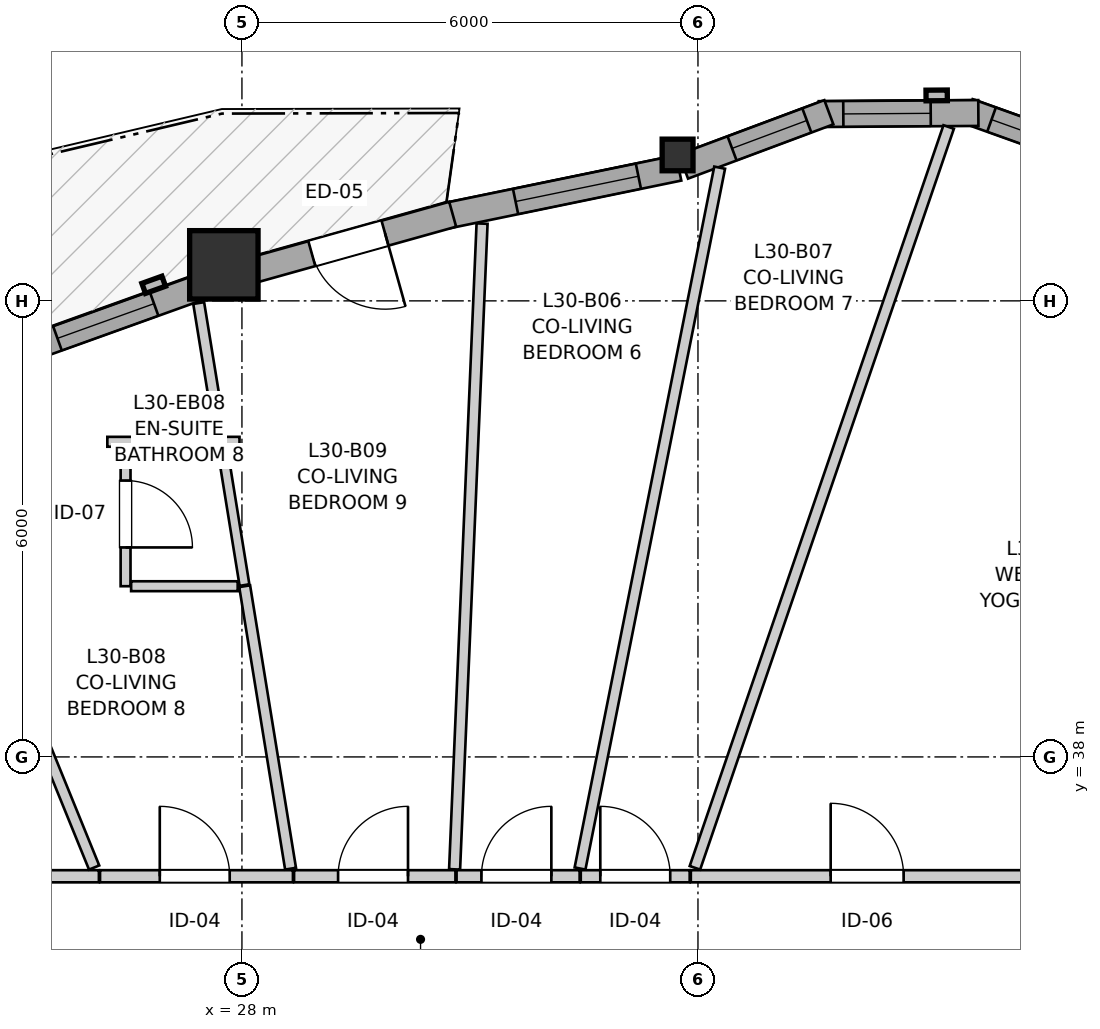
"""IFC4 building model, lengths in metres.
Left out: names, types, materials, properties, quantities, classifications, styles, units other than length and angle.
Written with IfcOpenShell. Run it as: python <this file> out.ifc"""

import sys

from ifc_helpers import new_model, si_unit, direction, frame, frame_2d, origin, origin_2d, place, context, subcontext, project, spatial, rectangle, i_section, extrude, source, transform, mapped, element, fill, save


model = new_model("IFC4")
c1 = context("Model", 3, precision=1e-05, world=origin(), true_north=direction((0.0, 1.0)))
c2 = subcontext(c1, "Body", "Model", "MODEL_VIEW")
j1 = project(units=[si_unit("LENGTHUNIT", "METRE"), si_unit("PLANEANGLEUNIT", "RADIAN")], contexts=[c1])
p1 = place(None, origin())
s1 = spatial("IfcSite", under=j1, at=p1, CompositionType="ELEMENT")
p2 = place(p1, origin())
s2 = spatial("IfcBuilding", under=s1, at=p2, CompositionType="ELEMENT")
p3 = place(p2, frame((0.0, 0.0, 102.4)))
s3 = spatial("IfcBuildingStorey", under=s2, at=p3, CompositionType="ELEMENT", Elevation=102.4)
m1 = source(origin(), c2, "Body", "SweptSolid", [
    extrude(i_section(OverallWidth=0.406, OverallDepth=0.416, WebThickness=0.027, FlangeThickness=0.044, FilletRadius=0.015, at=origin_2d()), origin(), (0.0, 0.0, 1.0), 2.95),
])
p4 = place(p3, frame((33.732, 45.92, 0.0), z_axis=(0.0, 0.0, 1.0), x_axis=(1.0, 0.0, 0.0)))
e1 = element("IfcColumn", 1, at=p4, inside=s3, PredefinedType="PILASTER", context=c2, shape_type="MappedRepresentation", body=[
    mapped(m1, transform((0.0, 0.0, 0.0), x_axis=(1.0, 0.0, 0.0), y_axis=(0.0, 1.0, 0.0), z_axis=(0.0, 0.0, 1.0), scale=1.0)),
])
m2 = source(origin(), c2, "Body", "SweptSolid", [
    extrude(rectangle(XDim=0.9, YDim=0.9, at=origin_2d()), origin(), (0.0, 0.0, 1.0), 2.95),
])
p5 = place(p3, frame((27.762, 44.474, 0.0), z_axis=(0.0, 0.0, 1.0), x_axis=(1.0, 0.0, 0.0)))
e2 = element("IfcColumn", 2, at=p5, inside=s3, PredefinedType="COLUMN", context=c2, shape_type="MappedRepresentation", body=[
    mapped(m2, transform((0.0, 0.0, 0.0), x_axis=(1.0, 0.0, 0.0), y_axis=(0.0, 1.0, 0.0), z_axis=(0.0, 0.0, 1.0), scale=1.0)),
])
p6 = place(p3, frame((39.533, 45.787, 0.0), z_axis=(0.0, 0.0, 1.0), x_axis=(-0.941523304278, 0.336947870598, 0.0)))
e3 = element("IfcWall", 3, at=p6, inside=s3, PredefinedType="SOLIDWALL", context=c2, shape_type="SweptSolid", body=[
    extrude(rectangle(XDim=2.099, YDim=0.34, at=frame_2d((1.05, 0.0))), origin(), (0.0, 0.0, 1.0), 2.48),
])
p7 = place(p6, frame((0.324, 0.0, 0.82)))
e4 = element("IfcOpeningElement", 4, at=p7, cuts=e3, PredefinedType="OPENING", context=c2, shape_type="SweptSolid", body=[
    extrude(rectangle(XDim=1.45, YDim=1.25, at=frame_2d((0.725, 0.625))), frame((0.0, 0.18, 0.0), z_axis=(0.0, -1.0, 0.0), x_axis=(1.0, 0.0, 0.0)), (0.0, 0.0, 1.0), 0.36),
])
p8 = place(p3, frame((37.689, 46.471, 0.0), z_axis=(0.0, 0.0, 1.0), x_axis=(-0.999976456891, -0.00686189939, 0.0)))
e5 = element("IfcWall", 5, at=p8, inside=s3, PredefinedType="SOLIDWALL", context=c2, shape_type="SweptSolid", body=[
    extrude(rectangle(XDim=2.099, YDim=0.34, at=frame_2d((1.05, 0.0))), origin(), (0.0, 0.0, 1.0), 2.48),
])
p9 = place(p8, frame((0.627, 0.0, 0.82)))
e6 = element("IfcOpeningElement", 6, at=p9, cuts=e5, PredefinedType="OPENING", context=c2, shape_type="SweptSolid", body=[
    extrude(rectangle(XDim=1.15, YDim=1.2, at=frame_2d((0.575, 0.6))), frame((0.0, 0.18, 0.0), z_axis=(0.0, -1.0, 0.0), x_axis=(1.0, 0.0, 0.0)), (0.0, 0.0, 1.0), 0.36),
])
p10 = place(p3, frame((35.722, 46.481, 0.0), z_axis=(0.0, 0.0, 1.0), x_axis=(-0.9368002254, -0.349864741994, 0.0)))
e7 = element("IfcWall", 7, at=p10, inside=s3, PredefinedType="SOLIDWALL", context=c2, shape_type="SweptSolid", body=[
    extrude(rectangle(XDim=2.041, YDim=0.34, at=frame_2d((1.021, 0.0))), origin(), (0.0, 0.0, 1.0), 2.48),
])
p11 = place(p10, frame((0.309, 0.0, 0.82)))
e8 = element("IfcOpeningElement", 8, at=p11, cuts=e7, PredefinedType="OPENING", context=c2, shape_type="SweptSolid", body=[
    extrude(rectangle(XDim=1.05, YDim=1.45, at=frame_2d((0.525, 0.725))), frame((0.0, 0.18, 0.0), z_axis=(0.0, -1.0, 0.0), x_axis=(1.0, 0.0, 0.0)), (0.0, 0.0, 1.0), 0.36),
])
p12 = place(p3, frame((33.747, 45.749, 0.0), z_axis=(0.0, 0.0, 1.0), x_axis=(-0.979440240026, -0.201734519153, 0.0)))
e9 = element("IfcWall", 9, at=p12, inside=s3, PredefinedType="SOLIDWALL", context=c2, shape_type="SweptSolid", body=[
    extrude(rectangle(XDim=3.124, YDim=0.34, at=frame_2d((1.562, 0.0))), origin(), (0.0, 0.0, 1.0), 2.48),
])
p13 = place(p12, frame((0.541, 0.0, 0.82)))
e10 = element("IfcOpeningElement", 10, at=p13, cuts=e9, PredefinedType="OPENING", context=c2, shape_type="SweptSolid", body=[
    extrude(rectangle(XDim=1.65, YDim=1.45, at=frame_2d((0.825, 0.725))), frame((0.0, 0.18, 0.0), z_axis=(0.0, -1.0, 0.0), x_axis=(1.0, 0.0, 0.0)), (0.0, 0.0, 1.0), 0.36),
])
p14 = place(p3, frame((30.773, 45.139, 0.0), z_axis=(0.0, 0.0, 1.0), x_axis=(-0.963038749839, -0.269362889627, 0.0)))
e11 = element("IfcWall", 11, at=p14, inside=s3, PredefinedType="SOLIDWALL", context=c2, shape_type="SweptSolid", body=[
    extrude(rectangle(XDim=2.849, YDim=0.34, at=frame_2d((1.424, 0.0))), origin(), (0.0, 0.0, 1.0), 2.48),
])
p15 = place(p14, frame((0.924, 0.0, 0.0)))
e12 = element("IfcOpeningElement", 12, at=p15, cuts=e11, PredefinedType="OPENING", context=c2, shape_type="SweptSolid", body=[
    extrude(rectangle(XDim=1.0, YDim=2.1, at=frame_2d((0.5, 1.05))), frame((0.0, 0.18, 0.0), z_axis=(0.0, -1.0, 0.0), x_axis=(1.0, 0.0, 0.0)), (0.0, 0.0, 1.0), 0.36),
])
p16 = place(p3, frame((27.603, 44.236, 0.0), z_axis=(0.0, 0.0, 1.0), x_axis=(-0.941110715193, -0.33809853852, 0.0)))
e13 = element("IfcWall", 13, at=p16, inside=s3, PredefinedType="SOLIDWALL", context=c2, shape_type="SweptSolid", body=[
    extrude(rectangle(XDim=2.799, YDim=0.34, at=frame_2d((1.399, 0.0))), origin(), (0.0, 0.0, 1.0), 2.48),
])
p17 = place(p16, frame((0.807, 0.0, 0.82)))
e14 = element("IfcOpeningElement", 14, at=p17, cuts=e13, PredefinedType="OPENING", context=c2, shape_type="SweptSolid", body=[
    extrude(rectangle(XDim=1.35, YDim=1.45, at=frame_2d((0.675, 0.725))), frame((0.0, 0.18, 0.0), z_axis=(0.0, -1.0, 0.0), x_axis=(1.0, 0.0, 0.0)), (0.0, 0.0, 1.0), 0.36),
])
p18 = place(p3, frame((33.906, 36.43, 0.0), z_axis=(0.0, 0.0, 1.0), x_axis=(1.0, 0.0, 0.0)))
e15 = element("IfcWall", 15, at=p18, inside=s3, PredefinedType="PARTITIONING", context=c2, shape_type="SweptSolid", body=[
    extrude(rectangle(XDim=4.624, YDim=0.16, at=frame_2d((2.312, 0.0))), origin(), (0.0, 0.0, 1.0), 2.588),
])
p19 = place(p18, frame((1.84, 0.0, 0.0)))
e16 = element("IfcOpeningElement", 16, at=p19, cuts=e15, PredefinedType="OPENING", context=c2, shape_type="SweptSolid", body=[
    extrude(rectangle(XDim=0.96, YDim=2.1, at=frame_2d((0.48, 1.05))), frame((0.0, 0.09, 0.0), z_axis=(0.0, -1.0, 0.0), x_axis=(1.0, 0.0, 0.0)), (0.0, 0.0, 1.0), 0.18),
])
p20 = place(p3, frame((22.17, 36.43, 0.0), z_axis=(0.0, 0.0, 1.0), x_axis=(1.0, 0.0, 0.0)))
e17 = element("IfcWall", 17, at=p20, inside=s3, PredefinedType="PARTITIONING", context=c2, shape_type="SweptSolid", body=[
    extrude(rectangle(XDim=3.948, YDim=0.16, at=frame_2d((1.974, 0.0))), origin(), (0.0, 0.0, 1.0), 2.588),
])
p21 = place(p20, frame((1.506, 0.0, 0.0)))
e18 = element("IfcOpeningElement", 18, at=p21, cuts=e17, PredefinedType="OPENING", context=c2, shape_type="SweptSolid", body=[
    extrude(rectangle(XDim=0.92, YDim=2.1, at=frame_2d((0.46, 1.05))), frame((0.0, 0.09, 0.0), z_axis=(0.0, -1.0, 0.0), x_axis=(1.0, 0.0, 0.0)), (0.0, 0.0, 1.0), 0.18),
])
p22 = place(p3, frame((26.133, 36.43, 0.0), z_axis=(0.0, 0.0, 1.0), x_axis=(1.0, 0.0, 0.0)))
e19 = element("IfcWall", 19, at=p22, inside=s3, PredefinedType="PARTITIONING", context=c2, shape_type="SweptSolid", body=[
    extrude(rectangle(XDim=2.538, YDim=0.16, at=frame_2d((1.269, 0.0))), origin(), (0.0, 0.0, 1.0), 2.95),
])
p23 = place(p22, frame((0.786, 0.0, 0.0)))
e20 = element("IfcOpeningElement", 20, at=p23, cuts=e19, PredefinedType="OPENING", context=c2, shape_type="SweptSolid", body=[
    extrude(rectangle(XDim=0.92, YDim=2.1, at=frame_2d((0.46, 1.05))), frame((0.0, 0.09, 0.0), z_axis=(0.0, -1.0, 0.0), x_axis=(1.0, 0.0, 0.0)), (0.0, 0.0, 1.0), 0.18),
])
p24 = place(p3, frame((28.686, 36.43, 0.0), z_axis=(0.0, 0.0, 1.0), x_axis=(1.0, 0.0, 0.0)))
e21 = element("IfcWall", 21, at=p24, inside=s3, PredefinedType="PARTITIONING", context=c2, shape_type="SweptSolid", body=[
    extrude(rectangle(XDim=2.123, YDim=0.16, at=frame_2d((1.062, 0.0))), origin(), (0.0, 0.0, 1.0), 2.95),
])
p25 = place(p24, frame((0.579, 0.0, 0.0)))
e22 = element("IfcOpeningElement", 22, at=p25, cuts=e21, PredefinedType="OPENING", context=c2, shape_type="SweptSolid", body=[
    extrude(rectangle(XDim=0.92, YDim=2.1, at=frame_2d((0.46, 1.05))), frame((0.0, 0.09, 0.0), z_axis=(0.0, -1.0, 0.0), x_axis=(1.0, 0.0, 0.0)), (0.0, 0.0, 1.0), 0.18),
])
p26 = place(p3, frame((26.469, 42.073, 0.0), z_axis=(0.0, 0.0, 1.0), x_axis=(0.0, -1.0, 0.0)))
e23 = element("IfcWall", 23, at=p26, inside=s3, PredefinedType="PARTITIONING", context=c2, shape_type="SweptSolid", body=[
    extrude(rectangle(XDim=1.827, YDim=0.13, at=frame_2d((0.914, 0.0))), origin(), (0.0, 0.0, 1.0), 2.95),
])
p27 = place(p26, frame((0.437, 0.0, 0.0)))
e24 = element("IfcOpeningElement", 24, at=p27, cuts=e23, PredefinedType="OPENING", context=c2, shape_type="SweptSolid", body=[
    extrude(rectangle(XDim=0.88, YDim=2.05, at=frame_2d((0.44, 1.025))), frame((0.0, 0.075, 0.0), z_axis=(0.0, -1.0, 0.0), x_axis=(1.0, 0.0, 0.0)), (0.0, 0.0, 1.0), 0.15),
])
p28 = place(p3, frame((30.824, 36.43, 0.0), z_axis=(0.0, 0.0, 1.0), x_axis=(1.0, 0.0, 0.0)))
e25 = element("IfcWall", 25, at=p28, inside=s3, PredefinedType="PARTITIONING", context=c2, shape_type="SweptSolid", body=[
    extrude(rectangle(XDim=1.619, YDim=0.16, at=frame_2d((0.81, 0.0))), origin(), (0.0, 0.0, 1.0), 2.95),
])
p29 = place(p28, frame((0.327, 0.0, 0.0)))
e26 = element("IfcOpeningElement", 26, at=p29, cuts=e25, PredefinedType="OPENING", context=c2, shape_type="SweptSolid", body=[
    extrude(rectangle(XDim=0.92, YDim=2.1, at=frame_2d((0.46, 1.05))), frame((0.0, 0.09, 0.0), z_axis=(0.0, -1.0, 0.0), x_axis=(1.0, 0.0, 0.0)), (0.0, 0.0, 1.0), 0.18),
])
p30 = place(p3, frame((32.458, 36.43, 0.0), z_axis=(0.0, 0.0, 1.0), x_axis=(1.0, 0.0, 0.0)))
e27 = element("IfcWall", 27, at=p30, inside=s3, PredefinedType="PARTITIONING", context=c2, shape_type="SweptSolid", body=[
    extrude(rectangle(XDim=1.433, YDim=0.16, at=frame_2d((0.717, 0.0))), origin(), (0.0, 0.0, 1.0), 2.95),
])
p31 = place(p30, frame((0.257, 0.0, 0.0)))
e28 = element("IfcOpeningElement", 28, at=p31, cuts=e27, PredefinedType="OPENING", context=c2, shape_type="SweptSolid", body=[
    extrude(rectangle(XDim=0.92, YDim=2.1, at=frame_2d((0.46, 1.05))), frame((0.0, 0.09, 0.0), z_axis=(0.0, -1.0, 0.0), x_axis=(1.0, 0.0, 0.0)), (0.0, 0.0, 1.0), 0.18),
])
p32 = place(p3, frame((33.96, 36.541, 0.0), z_axis=(0.0, 0.0, 1.0), x_axis=(0.324058346196, 0.946037096662, 0.0)))
e29 = element("IfcWall", 29, at=p32, inside=s3, PredefinedType="PARTITIONING", context=c2, shape_type="SweptSolid", body=[
    extrude(rectangle(XDim=10.302, YDim=0.145, at=frame_2d((5.151, 0.0))), origin(), (0.0, 0.0, 1.0), 2.95),
])
p33 = place(p3, frame((32.448, 36.532, 0.0), z_axis=(0.0, 0.0, 1.0), x_axis=(0.195406965811, 0.980722242897, 0.0)))
e30 = element("IfcWall", 30, at=p33, inside=s3, PredefinedType="PARTITIONING", context=c2, shape_type="SweptSolid", body=[
    extrude(rectangle(XDim=9.402, YDim=0.145, at=frame_2d((4.701, 0.0))), origin(), (0.0, 0.0, 1.0), 2.95),
])
p34 = place(p3, frame((30.798, 36.521, 0.0), z_axis=(0.0, 0.0, 1.0), x_axis=(0.042521424142, 0.999095555234, 0.0)))
e31 = element("IfcWall", 31, at=p34, inside=s3, PredefinedType="PARTITIONING", context=c2, shape_type="SweptSolid", body=[
    extrude(rectangle(XDim=8.503, YDim=0.145, at=frame_2d((4.252, 0.0))), origin(), (0.0, 0.0, 1.0), 2.95),
])
p35 = place(p3, frame((23.633, 42.493, 0.0), z_axis=(0.0, 0.0, 1.0), x_axis=(0.37719666663, -0.926133184096, 0.0)))
e32 = element("IfcWall", 32, at=p35, inside=s3, PredefinedType="PARTITIONING", context=c2, shape_type="SweptSolid", body=[
    extrude(rectangle(XDim=6.423, YDim=0.145, at=frame_2d((3.211, 0.0))), origin(), (0.0, 0.0, 1.0), 2.95),
])
p36 = place(p3, frame((28.036, 40.246, 0.0), z_axis=(0.0, 0.0, 1.0), x_axis=(0.160412651813, -0.987050039835, 0.0)))
e33 = element("IfcWall", 33, at=p36, inside=s3, PredefinedType="PARTITIONING", context=c2, shape_type="SweptSolid", body=[
    extrude(rectangle(XDim=3.765, YDim=0.145, at=frame_2d((1.883, 0.0))), origin(), (0.0, 0.0, 1.0), 2.368),
])
p37 = place(p3, frame((27.741, 42.063, 0.0), z_axis=(0.0, 0.0, 1.0), x_axis=(0.160081724147, -0.98710376435, 0.0)))
e34 = element("IfcWall", 34, at=p37, inside=s3, PredefinedType="PARTITIONING", context=c2, shape_type="SweptSolid", body=[
    extrude(rectangle(XDim=1.825, YDim=0.13, at=frame_2d((0.913, 0.0))), origin(), (0.0, 0.0, 1.0), 2.368),
])
p38 = place(p3, frame((27.431, 43.971, 0.0), z_axis=(0.0, 0.0, 1.0), x_axis=(0.160707234414, -0.987002119961, 0.0)))
e35 = element("IfcWall", 35, at=p38, inside=s3, PredefinedType="PARTITIONING", context=c2, shape_type="SweptSolid", body=[
    extrude(rectangle(XDim=1.749, YDim=0.145, at=frame_2d((0.874, 0.0))), origin(), (0.0, 0.0, 1.0), 2.95),
])
p39 = place(p3, frame((26.542, 40.246, 0.0), z_axis=(0.0, 0.0, 1.0), x_axis=(1.0, 0.0, 0.0)))
e36 = element("IfcWall", 36, at=p39, inside=s3, PredefinedType="PARTITIONING", context=c2, shape_type="SweptSolid", body=[
    extrude(rectangle(XDim=1.402, YDim=0.13, at=frame_2d((0.701, 0.0))), origin(), (0.0, 0.0, 1.0), 2.95),
])
p40 = place(p3, frame((26.229, 42.146, 0.0), z_axis=(0.0, 0.0, 1.0), x_axis=(1.0, 0.0, 0.0)))
e37 = element("IfcWall", 37, at=p40, inside=s3, PredefinedType="PARTITIONING", context=c2, shape_type="SweptSolid", body=[
    extrude(rectangle(XDim=1.739, YDim=0.13, at=frame_2d((0.87, 0.0))), origin(), (0.0, 0.0, 1.0), 2.95),
])
m3 = source(origin(), c2, "Body", "SweptSolid", [
    extrude(rectangle(XDim=1.45, YDim=1.25, at=frame_2d((0.725, 0.625))), frame((0.0, 0.03, 0.0), z_axis=(0.0, -1.0, 0.0), x_axis=(1.0, 0.0, 0.0)), (0.0, 0.0, 1.0), 0.06),
])
p41 = place(p7, origin())
e38 = element("IfcWindow", 38, at=p41, inside=s3, PartitioningType="SINGLE_PANEL", PredefinedType="WINDOW", context=c2, shape_type="MappedRepresentation", body=[
    mapped(m3, transform((0.0, 0.0, 0.0), x_axis=(1.0, 0.0, 0.0), y_axis=(0.0, 1.0, 0.0), z_axis=(0.0, 0.0, 1.0), scale=1.0)),
])
fill(e4, e38)
m4 = source(origin(), c2, "Body", "SweptSolid", [
    extrude(rectangle(XDim=1.15, YDim=1.2, at=frame_2d((0.575, 0.6))), frame((0.0, 0.03, 0.0), z_axis=(0.0, -1.0, 0.0), x_axis=(1.0, 0.0, 0.0)), (0.0, 0.0, 1.0), 0.06),
])
p42 = place(p9, origin())
e39 = element("IfcWindow", 39, at=p42, inside=s3, PartitioningType="SINGLE_PANEL", PredefinedType="WINDOW", context=c2, shape_type="MappedRepresentation", body=[
    mapped(m4, transform((0.0, 0.0, 0.0), x_axis=(1.0, 0.0, 0.0), y_axis=(0.0, 1.0, 0.0), z_axis=(0.0, 0.0, 1.0), scale=1.0)),
])
fill(e6, e39)
m5 = source(origin(), c2, "Body", "SweptSolid", [
    extrude(rectangle(XDim=1.05, YDim=1.45, at=frame_2d((0.525, 0.725))), frame((0.0, 0.03, 0.0), z_axis=(0.0, -1.0, 0.0), x_axis=(1.0, 0.0, 0.0)), (0.0, 0.0, 1.0), 0.06),
])
p43 = place(p11, origin())
e40 = element("IfcWindow", 40, at=p43, inside=s3, PartitioningType="SINGLE_PANEL", PredefinedType="WINDOW", context=c2, shape_type="MappedRepresentation", body=[
    mapped(m5, transform((0.0, 0.0, 0.0), x_axis=(1.0, 0.0, 0.0), y_axis=(0.0, 1.0, 0.0), z_axis=(0.0, 0.0, 1.0), scale=1.0)),
])
fill(e8, e40)
m6 = source(origin(), c2, "Body", "SweptSolid", [
    extrude(rectangle(XDim=1.65, YDim=1.45, at=frame_2d((0.825, 0.725))), frame((0.0, 0.03, 0.0), z_axis=(0.0, -1.0, 0.0), x_axis=(1.0, 0.0, 0.0)), (0.0, 0.0, 1.0), 0.06),
])
p44 = place(p13, origin())
e41 = element("IfcWindow", 41, at=p44, inside=s3, PartitioningType="SINGLE_PANEL", PredefinedType="WINDOW", context=c2, shape_type="MappedRepresentation", body=[
    mapped(m6, transform((0.0, 0.0, 0.0), x_axis=(1.0, 0.0, 0.0), y_axis=(0.0, 1.0, 0.0), z_axis=(0.0, 0.0, 1.0), scale=1.0)),
])
fill(e10, e41)
m7 = source(origin(), c2, "Body", "SweptSolid", [
    extrude(rectangle(XDim=1.35, YDim=1.45, at=frame_2d((0.675, 0.725))), frame((0.0, 0.03, 0.0), z_axis=(0.0, -1.0, 0.0), x_axis=(1.0, 0.0, 0.0)), (0.0, 0.0, 1.0), 0.06),
])
p45 = place(p17, origin())
e42 = element("IfcWindow", 42, at=p45, inside=s3, PartitioningType="SINGLE_PANEL", PredefinedType="WINDOW", context=c2, shape_type="MappedRepresentation", body=[
    mapped(m7, transform((0.0, 0.0, 0.0), x_axis=(1.0, 0.0, 0.0), y_axis=(0.0, 1.0, 0.0), z_axis=(0.0, 0.0, 1.0), scale=1.0)),
])
fill(e14, e42)
m8 = source(origin(), c2, "Body", "SweptSolid", [
    extrude(rectangle(XDim=1.0, YDim=2.1, at=frame_2d((0.5, 1.05))), frame((0.0, 0.025, 0.0), z_axis=(0.0, -1.0, 0.0), x_axis=(1.0, 0.0, 0.0)), (0.0, 0.0, 1.0), 0.05),
])
p46 = place(p15, origin())
e43 = element("IfcDoor", 43, at=p46, inside=s3, OperationType="SINGLE_SWING_LEFT", PredefinedType="DOOR", context=c2, shape_type="MappedRepresentation", body=[
    mapped(m8, transform((0.0, 0.0, 0.0), x_axis=(1.0, 0.0, 0.0), y_axis=(0.0, 1.0, 0.0), z_axis=(0.0, 0.0, 1.0), scale=1.0)),
])
fill(e12, e43)
m9 = source(origin(), c2, "Body", "SweptSolid", [
    extrude(rectangle(XDim=0.96, YDim=2.1, at=frame_2d((0.48, 1.05))), frame((0.0, 0.025, 0.0), z_axis=(0.0, -1.0, 0.0), x_axis=(1.0, 0.0, 0.0)), (0.0, 0.0, 1.0), 0.05),
])
p47 = place(p19, origin())
e44 = element("IfcDoor", 44, at=p47, inside=s3, OperationType="SINGLE_SWING_LEFT", PredefinedType="DOOR", context=c2, shape_type="MappedRepresentation", body=[
    mapped(m9, transform((0.0, 0.0, 0.0), x_axis=(1.0, 0.0, 0.0), y_axis=(0.0, 1.0, 0.0), z_axis=(0.0, 0.0, 1.0), scale=1.0)),
])
fill(e16, e44)
m10 = source(origin(), c2, "Body", "SweptSolid", [
    extrude(rectangle(XDim=0.92, YDim=2.1, at=frame_2d((0.46, 1.05))), frame((0.0, 0.025, 0.0), z_axis=(0.0, -1.0, 0.0), x_axis=(1.0, 0.0, 0.0)), (0.0, 0.0, 1.0), 0.05),
])
p48 = place(p23, origin())
e45 = element("IfcDoor", 45, at=p48, inside=s3, OperationType="SINGLE_SWING_LEFT", PredefinedType="DOOR", context=c2, shape_type="MappedRepresentation", body=[
    mapped(m10, transform((0.0, 0.0, 0.0), x_axis=(1.0, 0.0, 0.0), y_axis=(0.0, 1.0, 0.0), z_axis=(0.0, 0.0, 1.0), scale=1.0)),
])
fill(e20, e45)
p49 = place(p25, origin())
e46 = element("IfcDoor", 46, at=p49, inside=s3, OperationType="SINGLE_SWING_RIGHT", PredefinedType="DOOR", context=c2, shape_type="MappedRepresentation", body=[
    mapped(m10, transform((0.0, 0.0, 0.0), x_axis=(1.0, 0.0, 0.0), y_axis=(0.0, 1.0, 0.0), z_axis=(0.0, 0.0, 1.0), scale=1.0)),
])
fill(e22, e46)
m11 = source(origin(), c2, "Body", "SweptSolid", [
    extrude(rectangle(XDim=0.88, YDim=2.05, at=frame_2d((0.44, 1.025))), frame((0.0, 0.025, 0.0), z_axis=(0.0, -1.0, 0.0), x_axis=(1.0, 0.0, 0.0)), (0.0, 0.0, 1.0), 0.05),
])
p50 = place(p27, origin())
e47 = element("IfcDoor", 47, at=p50, inside=s3, OperationType="SINGLE_SWING_RIGHT", PredefinedType="DOOR", context=c2, shape_type="MappedRepresentation", body=[
    mapped(m11, transform((0.0, 0.0, 0.0), x_axis=(1.0, 0.0, 0.0), y_axis=(0.0, 1.0, 0.0), z_axis=(0.0, 0.0, 1.0), scale=1.0)),
])
fill(e24, e47)
p51 = place(p29, origin())
e48 = element("IfcDoor", 48, at=p51, inside=s3, OperationType="SINGLE_SWING_RIGHT", PredefinedType="DOOR", context=c2, shape_type="MappedRepresentation", body=[
    mapped(m10, transform((0.0, 0.0, 0.0), x_axis=(1.0, 0.0, 0.0), y_axis=(0.0, 1.0, 0.0), z_axis=(0.0, 0.0, 1.0), scale=1.0)),
])
fill(e26, e48)
p52 = place(p31, origin())
e49 = element("IfcDoor", 49, at=p52, inside=s3, OperationType="SINGLE_SWING_LEFT", PredefinedType="DOOR", context=c2, shape_type="MappedRepresentation", body=[
    mapped(m10, transform((0.0, 0.0, 0.0), x_axis=(1.0, 0.0, 0.0), y_axis=(0.0, 1.0, 0.0), z_axis=(0.0, 0.0, 1.0), scale=1.0)),
])
fill(e28, e49)
save(model, sys.argv[1])
